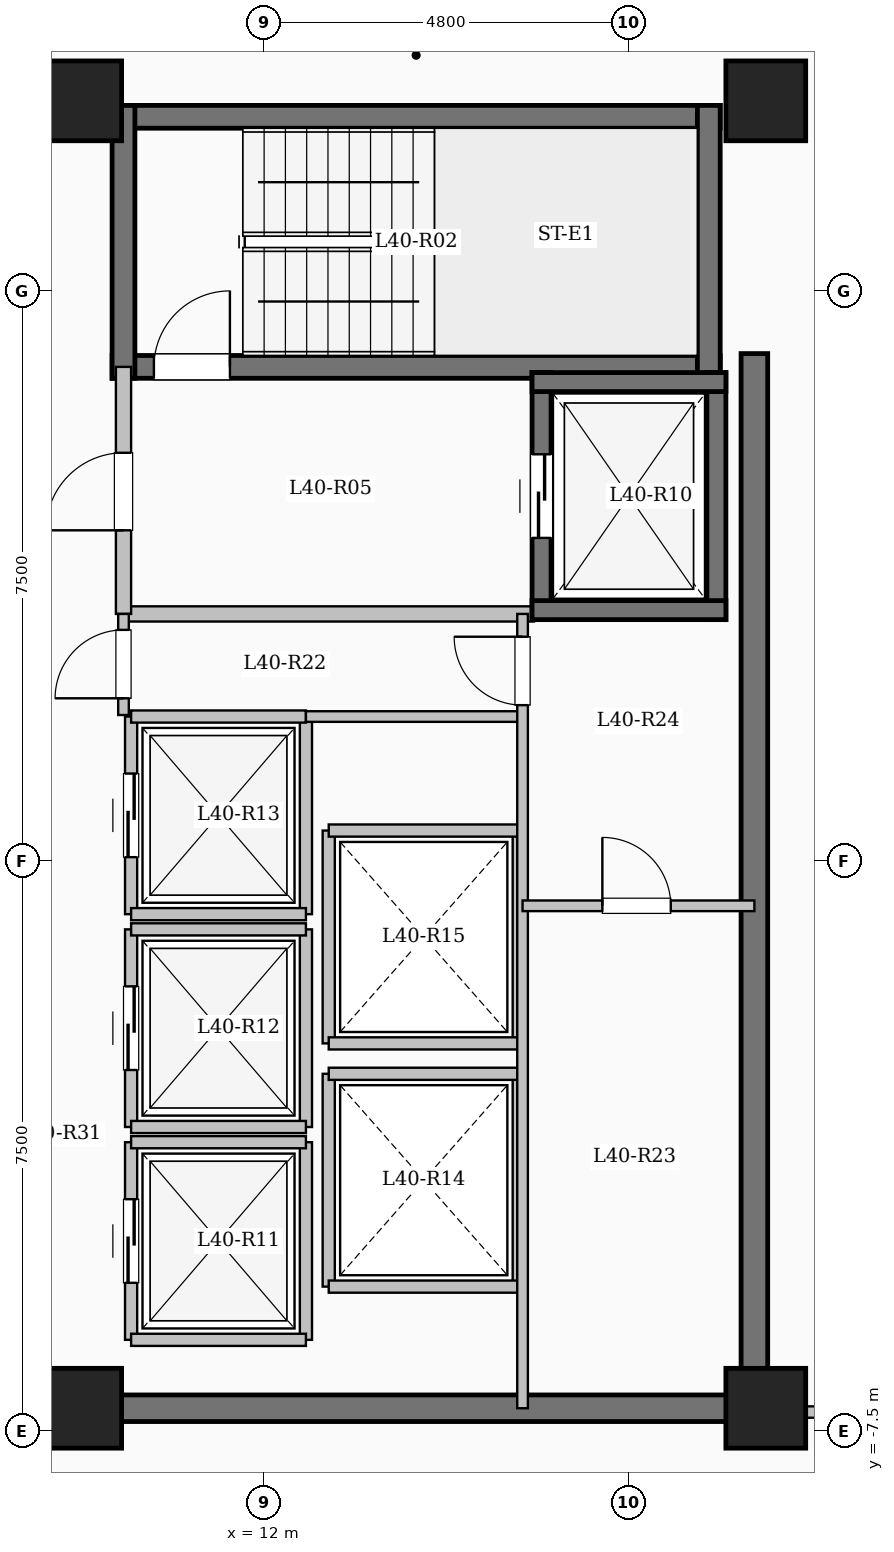
"""IFC4 building model, lengths in metres.
Left out: names, types, materials, properties, quantities, classifications, styles, units other than length and angle.
Written with IfcOpenShell. Run it as: python <this file> out.ifc"""

import sys

from ifc_helpers import new_model, si_unit, direction, frame, frame_2d, origin, origin_2d, place, context, subcontext, project, spatial, rectangle, extrude, element, fill, save


model = new_model("IFC4")
c1 = context("Model", 3, precision=1e-05, world=origin(), true_north=direction((0.0, 1.0)))
c2 = subcontext(c1, "Body", "Model", "MODEL_VIEW")
j1 = project(units=[si_unit("LENGTHUNIT", "METRE"), si_unit("PLANEANGLEUNIT", "RADIAN")], contexts=[c1])
p1 = place(None, origin())
s1 = spatial("IfcSite", under=j1, at=p1, CompositionType="ELEMENT")
p2 = place(p1, origin())
s2 = spatial("IfcBuilding", under=s1, at=p2, CompositionType="ELEMENT")
p3 = place(p2, frame((0.0, 0.0, 149.35)))
s3 = spatial("IfcBuildingStorey", under=s2, at=p3, CompositionType="ELEMENT", Elevation=149.35)
for number, where, z_axis, x_axis in (
    (1, (9.6, -7.2, 0.0), (0.0, 0.0, 1.0), (1.0, 0.0, 0.0)),
    (2, (9.6, 10.0, 0.0), (0.0, 0.0, 1.0), (1.0, 0.0, 0.0)),
    (3, (18.6, -7.2, 0.0), (0.0, 0.0, 1.0), (1.0, 0.0, 0.0)),
    (4, (18.6, 10.0, 0.0), (0.0, 0.0, 1.0), (1.0, 0.0, 0.0)),
):
    element("IfcColumn", number, at=place(p3, frame(where, z_axis=z_axis, x_axis=x_axis)), inside=s3, PredefinedType="COLUMN", context=c2, shape_type="SweptSolid", body=[
        extrude(rectangle(XDim=1.05, YDim=1.05, at=origin_2d()), origin(), (0.0, 0.0, 1.0), 3.35),
    ])
p4 = place(p3, frame((10.0, 9.79, 0.0), z_axis=(0.0, 0.0, 1.0), x_axis=(1.0, 0.0, 0.0)))
e5 = element("IfcWall", 5, at=p4, inside=s3, PredefinedType="SHEAR", context=c2, shape_type="SweptSolid", body=[
    extrude(rectangle(XDim=8.0, YDim=0.3, at=frame_2d((4.0, 0.0))), origin(), (0.0, 0.0, 1.0), 3.35),
])
p5 = place(p3, frame((10.0, 6.5, 0.0), z_axis=(0.0, 0.0, 1.0), x_axis=(1.0, 0.0, 0.0)))
e6 = element("IfcWall", 6, at=p5, inside=s3, PredefinedType="SHEAR", context=c2, shape_type="SweptSolid", body=[
    extrude(rectangle(XDim=8.0, YDim=0.3, at=frame_2d((4.0, 0.0))), origin(), (0.0, 0.0, 1.0), 3.35),
])
p6 = place(p5, frame((0.55, 0.0, 0.0)))
e7 = element("IfcOpeningElement", 7, at=p6, cuts=e6, PredefinedType="OPENING", context=c2, shape_type="SweptSolid", body=[
    extrude(rectangle(XDim=1.0, YDim=2.15, at=frame_2d((0.5, 1.075))), frame((0.0, 0.16, 0.0), z_axis=(0.0, -1.0, 0.0), x_axis=(1.0, 0.0, 0.0)), (0.0, 0.0, 1.0), 0.32),
])
for number, where, z_axis, x_axis in (
    (8, (10.15, 6.35, 0.0), (0.0, 0.0, 1.0), (0.0, 1.0, 0.0)),
    (9, (17.85, 6.35, 0.0), (0.0, 0.0, 1.0), (0.0, 1.0, 0.0)),
):
    element("IfcWall", number, at=place(p3, frame(where, z_axis=z_axis, x_axis=x_axis)), inside=s3, PredefinedType="SHEAR", context=c2, shape_type="SweptSolid", body=[
        extrude(rectangle(XDim=3.59, YDim=0.3, at=frame_2d((1.795, 0.0))), origin(), (0.0, 0.0, 1.0), 3.35),
    ])
p7 = place(p3, frame((10.15, 3.25, 0.0), z_axis=(0.0, 0.0, 1.0), x_axis=(1.0, 0.0, 0.0)))
e10 = element("IfcWall", 10, at=p7, inside=s3, PredefinedType="SOLIDWALL", context=c2, shape_type="SweptSolid", body=[
    extrude(rectangle(XDim=5.4, YDim=0.2, at=frame_2d((2.7, 0.0))), origin(), (0.0, 0.0, 1.0), 3.1),
])
p8 = place(p3, frame((10.15, 3.25, 0.0), z_axis=(0.0, 0.0, 1.0), x_axis=(0.0, 1.0, 0.0)))
e11 = element("IfcWall", 11, at=p8, inside=s3, PredefinedType="SOLIDWALL", context=c2, shape_type="SweptSolid", body=[
    extrude(rectangle(XDim=3.25, YDim=0.2, at=frame_2d((1.625, 0.0))), origin(), (0.0, 0.0, 1.0), 3.1),
])
p9 = place(p8, frame((1.1, 0.0, 0.0)))
e12 = element("IfcOpeningElement", 12, at=p9, cuts=e11, PredefinedType="OPENING", context=c2, shape_type="SweptSolid", body=[
    extrude(rectangle(XDim=1.02, YDim=2.15, at=frame_2d((0.51, 1.075))), frame((0.0, 0.11, 0.0), z_axis=(0.0, -1.0, 0.0), x_axis=(1.0, 0.0, 0.0)), (0.0, 0.0, 1.0), 0.22),
])
p10 = place(p3, frame((15.65, 3.175, 0.0), z_axis=(0.0, 0.0, 1.0), x_axis=(0.0, 1.0, 0.0)))
e13 = element("IfcWall", 13, at=p10, inside=s3, PredefinedType="SHEAR", context=c2, shape_type="SweptSolid", body=[
    extrude(rectangle(XDim=3.25, YDim=0.25, at=frame_2d((1.625, 0.0))), origin(), (0.0, 0.0, 1.0), 3.35),
])
p11 = place(p10, frame((1.075, 0.0, 0.0)))
e14 = element("IfcOpeningElement", 14, at=p11, cuts=e13, PredefinedType="OPENING", context=c2, shape_type="SweptSolid", body=[
    extrude(rectangle(XDim=1.1, YDim=2.15, at=frame_2d((0.55, 1.075))), frame((0.0, 0.135, 0.0), z_axis=(0.0, -1.0, 0.0), x_axis=(1.0, 0.0, 0.0)), (0.0, 0.0, 1.0), 0.27),
])
p12 = place(p3, frame((17.95, 3.175, 0.0), z_axis=(0.0, 0.0, 1.0), x_axis=(0.0, 1.0, 0.0)))
e15 = element("IfcWall", 15, at=p12, inside=s3, PredefinedType="SHEAR", context=c2, shape_type="SweptSolid", body=[
    extrude(rectangle(XDim=3.25, YDim=0.25, at=frame_2d((1.625, 0.0))), origin(), (0.0, 0.0, 1.0), 3.35),
])
for number, where, z_axis, x_axis in (
    (16, (15.525, 3.3, 0.0), (0.0, 0.0, 1.0), (1.0, 0.0, 0.0)),
    (17, (15.525, 6.3, 0.0), (0.0, 0.0, 1.0), (1.0, 0.0, 0.0)),
):
    element("IfcWall", number, at=place(p3, frame(where, z_axis=z_axis, x_axis=x_axis)), inside=s3, PredefinedType="SHEAR", context=c2, shape_type="SweptSolid", body=[
        extrude(rectangle(XDim=2.55, YDim=0.25, at=frame_2d((1.275, 0.0))), origin(), (0.0, 0.0, 1.0), 3.35),
    ])
p13 = place(p3, frame((10.25, -6.3, 0.0), z_axis=(0.0, 0.0, 1.0), x_axis=(0.0, 1.0, 0.0)))
e18 = element("IfcWall", 18, at=p13, inside=s3, PredefinedType="SOLIDWALL", context=c2, shape_type="SweptSolid", body=[
    extrude(rectangle(XDim=2.6, YDim=0.16, at=frame_2d((1.3, 0.0))), origin(), (0.0, 0.0, 1.0), 3.1),
])
p14 = place(p13, frame((0.75, 0.0, 0.0)))
e19 = element("IfcOpeningElement", 19, at=p14, cuts=e18, PredefinedType="OPENING", context=c2, shape_type="SweptSolid", body=[
    extrude(rectangle(XDim=1.1, YDim=2.15, at=frame_2d((0.55, 1.075))), frame((0.0, 0.09, 0.0), z_axis=(0.0, -1.0, 0.0), x_axis=(1.0, 0.0, 0.0)), (0.0, 0.0, 1.0), 0.18),
])
p15 = place(p3, frame((12.55, -6.3, 0.0), z_axis=(0.0, 0.0, 1.0), x_axis=(0.0, 1.0, 0.0)))
e20 = element("IfcWall", 20, at=p15, inside=s3, PredefinedType="SOLIDWALL", context=c2, shape_type="SweptSolid", body=[
    extrude(rectangle(XDim=2.6, YDim=0.16, at=frame_2d((1.3, 0.0))), origin(), (0.0, 0.0, 1.0), 3.1),
])
for number, where, z_axis, x_axis in (
    (21, (10.25, -6.3, 0.0), (0.0, 0.0, 1.0), (1.0, 0.0, 0.0)),
    (22, (10.25, -3.7, 0.0), (0.0, 0.0, 1.0), (1.0, 0.0, 0.0)),
):
    element("IfcWall", number, at=place(p3, frame(where, z_axis=z_axis, x_axis=x_axis)), inside=s3, PredefinedType="SOLIDWALL", context=c2, shape_type="SweptSolid", body=[
        extrude(rectangle(XDim=2.3, YDim=0.16, at=frame_2d((1.15, 0.0))), origin(), (0.0, 0.0, 1.0), 3.1),
    ])
p16 = place(p3, frame((10.25, -3.5, 0.0), z_axis=(0.0, 0.0, 1.0), x_axis=(0.0, 1.0, 0.0)))
e23 = element("IfcWall", 23, at=p16, inside=s3, PredefinedType="SOLIDWALL", context=c2, shape_type="SweptSolid", body=[
    extrude(rectangle(XDim=2.6, YDim=0.16, at=frame_2d((1.3, 0.0))), origin(), (0.0, 0.0, 1.0), 3.1),
])
p17 = place(p16, frame((0.75, 0.0, 0.0)))
e24 = element("IfcOpeningElement", 24, at=p17, cuts=e23, PredefinedType="OPENING", context=c2, shape_type="SweptSolid", body=[
    extrude(rectangle(XDim=1.1, YDim=2.15, at=frame_2d((0.55, 1.075))), frame((0.0, 0.09, 0.0), z_axis=(0.0, -1.0, 0.0), x_axis=(1.0, 0.0, 0.0)), (0.0, 0.0, 1.0), 0.18),
])
p18 = place(p3, frame((12.55, -3.5, 0.0), z_axis=(0.0, 0.0, 1.0), x_axis=(0.0, 1.0, 0.0)))
e25 = element("IfcWall", 25, at=p18, inside=s3, PredefinedType="SOLIDWALL", context=c2, shape_type="SweptSolid", body=[
    extrude(rectangle(XDim=2.6, YDim=0.16, at=frame_2d((1.3, 0.0))), origin(), (0.0, 0.0, 1.0), 3.1),
])
for number, where, z_axis, x_axis in (
    (26, (10.25, -3.5, 0.0), (0.0, 0.0, 1.0), (1.0, 0.0, 0.0)),
    (27, (10.25, -0.9, 0.0), (0.0, 0.0, 1.0), (1.0, 0.0, 0.0)),
):
    element("IfcWall", number, at=place(p3, frame(where, z_axis=z_axis, x_axis=x_axis)), inside=s3, PredefinedType="SOLIDWALL", context=c2, shape_type="SweptSolid", body=[
        extrude(rectangle(XDim=2.3, YDim=0.16, at=frame_2d((1.15, 0.0))), origin(), (0.0, 0.0, 1.0), 3.1),
    ])
p19 = place(p3, frame((10.25, -0.7, 0.0), z_axis=(0.0, 0.0, 1.0), x_axis=(0.0, 1.0, 0.0)))
e28 = element("IfcWall", 28, at=p19, inside=s3, PredefinedType="SOLIDWALL", context=c2, shape_type="SweptSolid", body=[
    extrude(rectangle(XDim=2.6, YDim=0.16, at=frame_2d((1.3, 0.0))), origin(), (0.0, 0.0, 1.0), 3.1),
])
p20 = place(p19, frame((0.75, 0.0, 0.0)))
e29 = element("IfcOpeningElement", 29, at=p20, cuts=e28, PredefinedType="OPENING", context=c2, shape_type="SweptSolid", body=[
    extrude(rectangle(XDim=1.1, YDim=2.15, at=frame_2d((0.55, 1.075))), frame((0.0, 0.09, 0.0), z_axis=(0.0, -1.0, 0.0), x_axis=(1.0, 0.0, 0.0)), (0.0, 0.0, 1.0), 0.18),
])
p21 = place(p3, frame((12.55, -0.7, 0.0), z_axis=(0.0, 0.0, 1.0), x_axis=(0.0, 1.0, 0.0)))
e30 = element("IfcWall", 30, at=p21, inside=s3, PredefinedType="SOLIDWALL", context=c2, shape_type="SweptSolid", body=[
    extrude(rectangle(XDim=2.6, YDim=0.16, at=frame_2d((1.3, 0.0))), origin(), (0.0, 0.0, 1.0), 3.1),
])
for number, where, z_axis, x_axis in (
    (31, (10.25, -0.7, 0.0), (0.0, 0.0, 1.0), (1.0, 0.0, 0.0)),
    (32, (10.25, 1.9, 0.0), (0.0, 0.0, 1.0), (1.0, 0.0, 0.0)),
):
    element("IfcWall", number, at=place(p3, frame(where, z_axis=z_axis, x_axis=x_axis)), inside=s3, PredefinedType="SOLIDWALL", context=c2, shape_type="SweptSolid", body=[
        extrude(rectangle(XDim=2.3, YDim=0.16, at=frame_2d((1.15, 0.0))), origin(), (0.0, 0.0, 1.0), 3.1),
    ])
for number, where, z_axis, x_axis in (
    (33, (12.85, -5.6, 0.0), (0.0, 0.0, 1.0), (0.0, 1.0, 0.0)),
    (34, (15.35, -5.6, 0.0), (0.0, 0.0, 1.0), (0.0, 1.0, 0.0)),
):
    element("IfcWall", number, at=place(p3, frame(where, z_axis=z_axis, x_axis=x_axis)), inside=s3, PredefinedType="SOLIDWALL", context=c2, shape_type="SweptSolid", body=[
        extrude(rectangle(XDim=2.8, YDim=0.16, at=frame_2d((1.4, 0.0))), origin(), (0.0, 0.0, 1.0), 3.1),
    ])
for number, where, z_axis, x_axis in (
    (35, (12.85, -5.6, 0.0), (0.0, 0.0, 1.0), (1.0, 0.0, 0.0)),
    (36, (12.85, -2.8, 0.0), (0.0, 0.0, 1.0), (1.0, 0.0, 0.0)),
):
    element("IfcWall", number, at=place(p3, frame(where, z_axis=z_axis, x_axis=x_axis)), inside=s3, PredefinedType="SOLIDWALL", context=c2, shape_type="SweptSolid", body=[
        extrude(rectangle(XDim=2.5, YDim=0.16, at=frame_2d((1.25, 0.0))), origin(), (0.0, 0.0, 1.0), 3.1),
    ])
for number, where, z_axis, x_axis in (
    (37, (12.85, -2.4, 0.0), (0.0, 0.0, 1.0), (0.0, 1.0, 0.0)),
    (38, (15.35, -2.4, 0.0), (0.0, 0.0, 1.0), (0.0, 1.0, 0.0)),
):
    element("IfcWall", number, at=place(p3, frame(where, z_axis=z_axis, x_axis=x_axis)), inside=s3, PredefinedType="SOLIDWALL", context=c2, shape_type="SweptSolid", body=[
        extrude(rectangle(XDim=2.8, YDim=0.16, at=frame_2d((1.4, 0.0))), origin(), (0.0, 0.0, 1.0), 3.1),
    ])
for number, where, z_axis, x_axis in (
    (39, (12.85, -2.4, 0.0), (0.0, 0.0, 1.0), (1.0, 0.0, 0.0)),
    (40, (12.85, 0.4, 0.0), (0.0, 0.0, 1.0), (1.0, 0.0, 0.0)),
):
    element("IfcWall", number, at=place(p3, frame(where, z_axis=z_axis, x_axis=x_axis)), inside=s3, PredefinedType="SOLIDWALL", context=c2, shape_type="SweptSolid", body=[
        extrude(rectangle(XDim=2.5, YDim=0.16, at=frame_2d((1.25, 0.0))), origin(), (0.0, 0.0, 1.0), 3.1),
    ])
p22 = place(p3, frame((18.45, -7.375, 0.0), z_axis=(0.0, 0.0, 1.0), x_axis=(0.0, 1.0, 0.0)))
e41 = element("IfcWall", 41, at=p22, inside=s3, PredefinedType="SHEAR", context=c2, shape_type="SweptSolid", body=[
    extrude(rectangle(XDim=14.05, YDim=0.35, at=frame_2d((7.025, 0.0))), origin(), (0.0, 0.0, 1.0), 3.35),
])
p23 = place(p3, frame((10.075, -7.2, 0.0), z_axis=(0.0, 0.0, 1.0), x_axis=(1.0, 0.0, 0.0)))
e42 = element("IfcWall", 42, at=p23, inside=s3, PredefinedType="SHEAR", context=c2, shape_type="SweptSolid", body=[
    extrude(rectangle(XDim=8.55, YDim=0.35, at=frame_2d((4.275, 0.0))), origin(), (0.0, 0.0, 1.0), 3.35),
])
p24 = place(p3, frame((12.55, 1.9, 0.0), z_axis=(0.0, 0.0, 1.0), x_axis=(1.0, 0.0, 0.0)))
e43 = element("IfcWall", 43, at=p24, inside=s3, PredefinedType="PARTITIONING", context=c2, shape_type="SweptSolid", body=[
    extrude(rectangle(XDim=2.85, YDim=0.14, at=frame_2d((1.425, 0.0))), origin(), (0.0, 0.0, 1.0), 3.1),
])
p25 = place(p3, frame((10.15, 1.92, 0.0), z_axis=(0.0, 0.0, 1.0), x_axis=(0.0, 1.0, 0.0)))
e44 = element("IfcWall", 44, at=p25, inside=s3, PredefinedType="PARTITIONING", context=c2, shape_type="SweptSolid", body=[
    extrude(rectangle(XDim=1.33, YDim=0.14, at=frame_2d((0.665, 0.0))), origin(), (0.0, 0.0, 1.0), 3.1),
])
p26 = place(p25, frame((0.22, 0.0, 0.0)))
e45 = element("IfcOpeningElement", 45, at=p26, cuts=e44, PredefinedType="OPENING", context=c2, shape_type="SweptSolid", body=[
    extrude(rectangle(XDim=0.9, YDim=2.08, at=frame_2d((0.45, 1.04))), frame((0.0, 0.08, 0.0), z_axis=(0.0, -1.0, 0.0), x_axis=(1.0, 0.0, 0.0)), (0.0, 0.0, 1.0), 0.16),
])
p27 = place(p3, frame((15.4, -7.2, 0.0), z_axis=(0.0, 0.0, 1.0), x_axis=(0.0, 1.0, 0.0)))
e46 = element("IfcWall", 46, at=p27, inside=s3, PredefinedType="PARTITIONING", context=c2, shape_type="SweptSolid", body=[
    extrude(rectangle(XDim=10.45, YDim=0.14, at=frame_2d((5.225, 0.0))), origin(), (0.0, 0.0, 1.0), 3.1),
])
p28 = place(p27, frame((9.25, 0.0, 0.0)))
e47 = element("IfcOpeningElement", 47, at=p28, cuts=e46, PredefinedType="OPENING", context=c2, shape_type="SweptSolid", body=[
    extrude(rectangle(XDim=0.9, YDim=2.08, at=frame_2d((0.45, 1.04))), frame((0.0, 0.08, 0.0), z_axis=(0.0, -1.0, 0.0), x_axis=(1.0, 0.0, 0.0)), (0.0, 0.0, 1.0), 0.16),
])
p29 = place(p3, frame((15.4, -0.59, 0.0), z_axis=(0.0, 0.0, 1.0), x_axis=(1.0, 0.0, 0.0)))
e48 = element("IfcWall", 48, at=p29, inside=s3, PredefinedType="PARTITIONING", context=c2, shape_type="SweptSolid", body=[
    extrude(rectangle(XDim=3.05, YDim=0.14, at=frame_2d((1.525, 0.0))), origin(), (0.0, 0.0, 1.0), 3.1),
])
p30 = place(p29, frame((1.05, 0.0, 0.0)))
e49 = element("IfcOpeningElement", 49, at=p30, cuts=e48, PredefinedType="OPENING", context=c2, shape_type="SweptSolid", body=[
    extrude(rectangle(XDim=0.9, YDim=2.08, at=frame_2d((0.45, 1.04))), frame((0.0, 0.08, 0.0), z_axis=(0.0, -1.0, 0.0), x_axis=(1.0, 0.0, 0.0)), (0.0, 0.0, 1.0), 0.16),
])
p31 = place(p3, frame((18.45, -7.25, 0.0), z_axis=(0.0, 0.0, 1.0), x_axis=(1.0, 0.0, 0.0)))
e50 = element("IfcWall", 50, at=p31, inside=s3, PredefinedType="PARTITIONING", context=c2, shape_type="SweptSolid", body=[
    extrude(rectangle(XDim=6.63, YDim=0.15, at=frame_2d((3.315, 0.0))), origin(), (0.0, 0.0, 1.0), 3.1),
])
p32 = place(p31, frame((1.95, 0.0, 0.0)))
e51 = element("IfcOpeningElement", 51, at=p32, cuts=e50, PredefinedType="OPENING", context=c2, shape_type="SweptSolid", body=[
    extrude(rectangle(XDim=1.08, YDim=2.15, at=frame_2d((0.54, 1.075))), frame((0.0, 0.085, 0.0), z_axis=(0.0, -1.0, 0.0), x_axis=(1.0, 0.0, 0.0)), (0.0, 0.0, 1.0), 0.17),
])
p33 = place(p6, origin())
e52 = element("IfcDoor", 52, at=p33, inside=s3, OperationType="SINGLE_SWING_RIGHT", PredefinedType="DOOR", context=c2, shape_type="SweptSolid", body=[
    extrude(rectangle(XDim=1.0, YDim=2.15, at=frame_2d((0.5, 1.075))), frame((0.0, 0.025, 0.0), z_axis=(0.0, -1.0, 0.0), x_axis=(1.0, 0.0, 0.0)), (0.0, 0.0, 1.0), 0.05),
])
fill(e7, e52)
p34 = place(p9, origin())
e53 = element("IfcDoor", 53, at=p34, inside=s3, OperationType="SINGLE_SWING_LEFT", PredefinedType="DOOR", context=c2, shape_type="SweptSolid", body=[
    extrude(rectangle(XDim=1.02, YDim=2.15, at=frame_2d((0.51, 1.075))), frame((0.0, 0.025, 0.0), z_axis=(0.0, -1.0, 0.0), x_axis=(1.0, 0.0, 0.0)), (0.0, 0.0, 1.0), 0.05),
])
fill(e12, e53)
p35 = place(p11, origin())
e54 = element("IfcDoor", 54, at=p35, inside=s3, OperationType="SLIDING_TO_LEFT", PredefinedType="DOOR", context=c2, shape_type="SweptSolid", body=[
    extrude(rectangle(XDim=1.1, YDim=2.15, at=frame_2d((0.55, 1.075))), frame((0.0, 0.025, 0.0), z_axis=(0.0, -1.0, 0.0), x_axis=(1.0, 0.0, 0.0)), (0.0, 0.0, 1.0), 0.05),
])
fill(e14, e54)
p36 = place(p14, origin())
e55 = element("IfcDoor", 55, at=p36, inside=s3, OperationType="SLIDING_TO_LEFT", PredefinedType="DOOR", context=c2, shape_type="SweptSolid", body=[
    extrude(rectangle(XDim=1.1, YDim=2.15, at=frame_2d((0.55, 1.075))), frame((0.0, 0.025, 0.0), z_axis=(0.0, -1.0, 0.0), x_axis=(1.0, 0.0, 0.0)), (0.0, 0.0, 1.0), 0.05),
])
fill(e19, e55)
p37 = place(p17, origin())
e56 = element("IfcDoor", 56, at=p37, inside=s3, OperationType="SLIDING_TO_LEFT", PredefinedType="DOOR", context=c2, shape_type="SweptSolid", body=[
    extrude(rectangle(XDim=1.1, YDim=2.15, at=frame_2d((0.55, 1.075))), frame((0.0, 0.025, 0.0), z_axis=(0.0, -1.0, 0.0), x_axis=(1.0, 0.0, 0.0)), (0.0, 0.0, 1.0), 0.05),
])
fill(e24, e56)
p38 = place(p20, origin())
e57 = element("IfcDoor", 57, at=p38, inside=s3, OperationType="SLIDING_TO_LEFT", PredefinedType="DOOR", context=c2, shape_type="SweptSolid", body=[
    extrude(rectangle(XDim=1.1, YDim=2.15, at=frame_2d((0.55, 1.075))), frame((0.0, 0.025, 0.0), z_axis=(0.0, -1.0, 0.0), x_axis=(1.0, 0.0, 0.0)), (0.0, 0.0, 1.0), 0.05),
])
fill(e29, e57)
p39 = place(p26, origin())
e58 = element("IfcDoor", 58, at=p39, inside=s3, OperationType="SINGLE_SWING_LEFT", PredefinedType="DOOR", context=c2, shape_type="SweptSolid", body=[
    extrude(rectangle(XDim=0.9, YDim=2.08, at=frame_2d((0.45, 1.04))), frame((0.0, 0.025, 0.0), z_axis=(0.0, -1.0, 0.0), x_axis=(1.0, 0.0, 0.0)), (0.0, 0.0, 1.0), 0.05),
])
fill(e45, e58)
p40 = place(p28, origin())
e59 = element("IfcDoor", 59, at=p40, inside=s3, OperationType="SINGLE_SWING_RIGHT", PredefinedType="DOOR", context=c2, shape_type="SweptSolid", body=[
    extrude(rectangle(XDim=0.9, YDim=2.08, at=frame_2d((0.45, 1.04))), frame((0.0, 0.025, 0.0), z_axis=(0.0, -1.0, 0.0), x_axis=(1.0, 0.0, 0.0)), (0.0, 0.0, 1.0), 0.05),
])
fill(e47, e59)
p41 = place(p30, origin())
e60 = element("IfcDoor", 60, at=p41, inside=s3, OperationType="SINGLE_SWING_LEFT", PredefinedType="DOOR", context=c2, shape_type="SweptSolid", body=[
    extrude(rectangle(XDim=0.9, YDim=2.08, at=frame_2d((0.45, 1.04))), frame((0.0, 0.025, 0.0), z_axis=(0.0, -1.0, 0.0), x_axis=(1.0, 0.0, 0.0)), (0.0, 0.0, 1.0), 0.05),
])
fill(e49, e60)
save(model, sys.argv[1])
